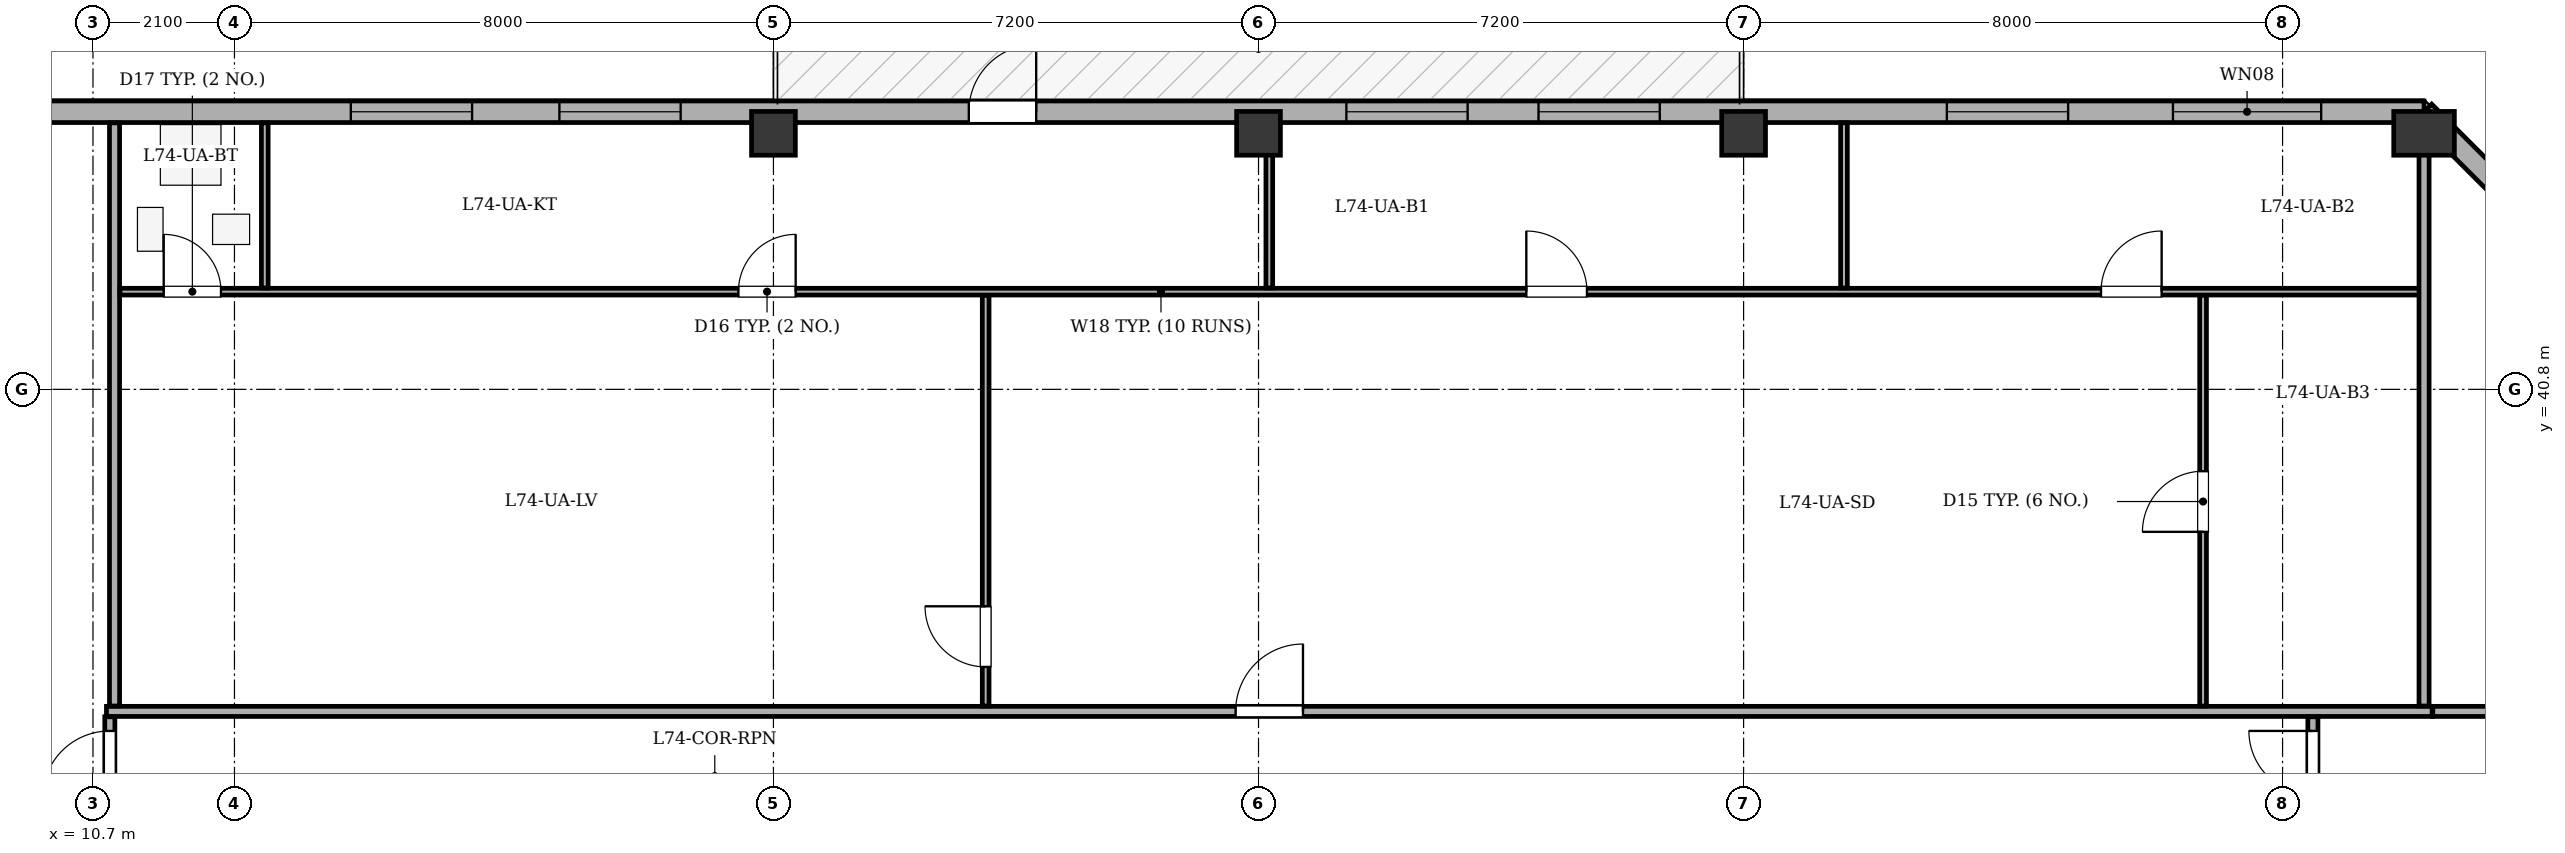
"""IFC4 building model, lengths in metres.
Left out: names, types, materials, properties, quantities, classifications, styles, units other than length and angle.
Written with IfcOpenShell. Run it as: python <this file> out.ifc"""

import sys

from ifc_helpers import new_model, si_unit, direction, frame, frame_2d, origin, origin_2d, place, context, subcontext, project, spatial, rectangle, extrude, element, fill, save


model = new_model("IFC4")
c1 = context("Model", 3, precision=1e-05, world=origin(), true_north=direction((0.0, 1.0)))
c2 = subcontext(c1, "Body", "Model", "MODEL_VIEW")
j1 = project(units=[si_unit("LENGTHUNIT", "METRE"), si_unit("PLANEANGLEUNIT", "RADIAN")], contexts=[c1])
p1 = place(None, origin())
s1 = spatial("IfcSite", under=j1, at=p1, CompositionType="ELEMENT")
p2 = place(p1, origin())
s2 = spatial("IfcBuilding", under=s1, at=p2, CompositionType="ELEMENT")
p3 = place(p2, frame((0.0, 0.0, 278.9)))
s3 = spatial("IfcBuildingStorey", under=s2, at=p3, CompositionType="ELEMENT", Elevation=278.9)
for number, where, z_axis, x_axis in (
    (1, (20.8, 44.6, 0.0), (0.0, 0.0, 1.0), (1.0, 0.0, 0.0)),
    (2, (28.0, 44.6, 0.0), (0.0, 0.0, 1.0), (1.0, 0.0, 0.0)),
    (3, (35.2, 44.6, 0.0), (0.0, 0.0, 1.0), (1.0, 0.0, 0.0)),
):
    element("IfcColumn", number, at=place(p3, frame(where, z_axis=z_axis, x_axis=x_axis)), inside=s3, PredefinedType="COLUMN", context=c2, shape_type="SweptSolid", body=[
        extrude(rectangle(XDim=0.65, YDim=0.65, at=origin_2d()), origin(), (0.0, 0.0, 1.0), 3.4),
    ])
p4 = place(p3, frame((45.3, 44.6, 0.0), z_axis=(0.0, 0.0, 1.0), x_axis=(1.0, 0.0, 0.0)))
e4 = element("IfcColumn", 4, at=p4, inside=s3, PredefinedType="COLUMN", context=c2, shape_type="SweptSolid", body=[
    extrude(rectangle(XDim=0.65, YDim=0.9, at=origin_2d()), origin(), (0.0, 0.0, 1.0), 3.4),
])
p5 = place(p3, frame((8.3, 44.92, 0.0), z_axis=(0.0, 0.0, 1.0), x_axis=(1.0, 0.0, 0.0)))
e5 = element("IfcWall", 5, at=p5, inside=s3, PredefinedType="STANDARD", context=c2, shape_type="SweptSolid", body=[
    extrude(rectangle(XDim=37.0, YDim=0.32, at=frame_2d((18.5, 0.0))), origin(), (0.0, 0.0, 1.0), 2.575),
])
p6 = place(p5, frame((15.4, 0.0, 0.0)))
e6 = element("IfcOpeningElement", 6, at=p6, cuts=e5, PredefinedType="OPENING", context=c2, shape_type="SweptSolid", body=[
    extrude(rectangle(XDim=1.0, YDim=2.02, at=frame_2d((0.5, 1.01))), frame((0.0, 0.17, 0.0), z_axis=(0.0, -1.0, 0.0), x_axis=(1.0, 0.0, 0.0)), (0.0, 0.0, 1.0), 0.34),
])
p7 = place(p5, frame((6.227, 0.0, 0.75)))
e7 = element("IfcOpeningElement", 7, at=p7, cuts=e5, PredefinedType="OPENING", context=c2, shape_type="SweptSolid", body=[
    extrude(rectangle(XDim=1.8, YDim=1.7, at=frame_2d((0.9, 0.85))), frame((0.0, 0.17, 0.0), z_axis=(0.0, -1.0, 0.0), x_axis=(1.0, 0.0, 0.0)), (0.0, 0.0, 1.0), 0.34),
])
p8 = place(p5, frame((9.323, 0.0, 0.75)))
e8 = element("IfcOpeningElement", 8, at=p8, cuts=e5, PredefinedType="OPENING", context=c2, shape_type="SweptSolid", body=[
    extrude(rectangle(XDim=1.8, YDim=1.7, at=frame_2d((0.9, 0.85))), frame((0.0, 0.17, 0.0), z_axis=(0.0, -1.0, 0.0), x_axis=(1.0, 0.0, 0.0)), (0.0, 0.0, 1.0), 0.34),
])
p9 = place(p5, frame((21.004, 0.0, 0.75)))
e9 = element("IfcOpeningElement", 9, at=p9, cuts=e5, PredefinedType="OPENING", context=c2, shape_type="SweptSolid", body=[
    extrude(rectangle(XDim=1.8, YDim=1.7, at=frame_2d((0.9, 0.85))), frame((0.0, 0.17, 0.0), z_axis=(0.0, -1.0, 0.0), x_axis=(1.0, 0.0, 0.0)), (0.0, 0.0, 1.0), 0.34),
])
p10 = place(p5, frame((23.856, 0.0, 0.75)))
e10 = element("IfcOpeningElement", 10, at=p10, cuts=e5, PredefinedType="OPENING", context=c2, shape_type="SweptSolid", body=[
    extrude(rectangle(XDim=1.8, YDim=1.7, at=frame_2d((0.9, 0.85))), frame((0.0, 0.17, 0.0), z_axis=(0.0, -1.0, 0.0), x_axis=(1.0, 0.0, 0.0)), (0.0, 0.0, 1.0), 0.34),
])
p11 = place(p5, frame((29.917, 0.0, 0.75)))
e11 = element("IfcOpeningElement", 11, at=p11, cuts=e5, PredefinedType="OPENING", context=c2, shape_type="SweptSolid", body=[
    extrude(rectangle(XDim=1.8, YDim=1.7, at=frame_2d((0.9, 0.85))), frame((0.0, 0.17, 0.0), z_axis=(0.0, -1.0, 0.0), x_axis=(1.0, 0.0, 0.0)), (0.0, 0.0, 1.0), 0.34),
])
p12 = place(p5, frame((33.273, 0.0, 0.75)))
e12 = element("IfcOpeningElement", 12, at=p12, cuts=e5, PredefinedType="OPENING", context=c2, shape_type="SweptSolid", body=[
    extrude(rectangle(XDim=2.2, YDim=1.7, at=frame_2d((1.1, 0.85))), frame((0.0, 0.17, 0.0), z_axis=(0.0, -1.0, 0.0), x_axis=(1.0, 0.0, 0.0)), (0.0, 0.0, 1.0), 0.34),
])
p13 = place(p3, frame((45.3, 44.92, 0.0), z_axis=(0.0, 0.0, 1.0), x_axis=(0.70712937715, -0.707084184501, 0.0)))
e13 = element("IfcWall", 13, at=p13, inside=s3, PredefinedType="STANDARD", context=c2, shape_type="SweptSolid", body=[
    extrude(rectangle(XDim=5.402, YDim=0.32, at=frame_2d((2.701, 0.0))), origin(), (0.0, 0.0, 1.0), 2.575),
])
p14 = place(p13, frame((2.001, 0.0, 0.75)))
e14 = element("IfcOpeningElement", 14, at=p14, cuts=e13, PredefinedType="OPENING", context=c2, shape_type="SweptSolid", body=[
    extrude(rectangle(XDim=1.4, YDim=1.65, at=frame_2d((0.7, 0.825))), frame((0.0, 0.17, 0.0), z_axis=(0.0, -1.0, 0.0), x_axis=(1.0, 0.0, 0.0)), (0.0, 0.0, 1.0), 0.34),
])
p15 = place(p3, frame((10.9, 36.02, 0.0), z_axis=(0.0, 0.0, 1.0), x_axis=(1.0, 0.0, 0.0)))
e15 = element("IfcWall", 15, at=p15, inside=s3, PredefinedType="PARTITIONING", context=c2, shape_type="SweptSolid", body=[
    extrude(rectangle(XDim=34.52, YDim=0.15, at=frame_2d((17.26, 0.0))), origin(), (0.0, 0.0, 1.0), 2.95),
])
p16 = place(p15, frame((16.76, 0.0, 0.0)))
e16 = element("IfcOpeningElement", 16, at=p16, cuts=e15, PredefinedType="OPENING", context=c2, shape_type="SweptSolid", body=[
    extrude(rectangle(XDim=1.0, YDim=2.1, at=frame_2d((0.5, 1.05))), frame((0.0, 0.085, 0.0), z_axis=(0.0, -1.0, 0.0), x_axis=(1.0, 0.0, 0.0)), (0.0, 0.0, 1.0), 0.17),
])
p17 = place(p3, frame((11.02, 36.1, 0.0), z_axis=(0.0, 0.0, 1.0), x_axis=(0.0, 1.0, 0.0)))
e17 = element("IfcWall", 17, at=p17, inside=s3, PredefinedType="PARTITIONING", context=c2, shape_type="SweptSolid", body=[
    extrude(rectangle(XDim=8.655, YDim=0.15, at=frame_2d((4.327, 0.0))), origin(), (0.0, 0.0, 1.0), 2.95),
])
p18 = place(p3, frame((11.1, 42.25, 0.0), z_axis=(0.0, 0.0, 1.0), x_axis=(1.0, 0.0, 0.0)))
e18 = element("IfcWall", 18, at=p18, inside=s3, PredefinedType="PARTITIONING", context=c2, shape_type="SweptSolid", body=[
    extrude(rectangle(XDim=34.24, YDim=0.1, at=frame_2d((17.12, 0.0))), origin(), (0.0, 0.0, 1.0), 2.95),
])
p19 = place(p18, frame((0.65, 0.0, 0.0)))
e19 = element("IfcOpeningElement", 19, at=p19, cuts=e18, PredefinedType="OPENING", context=c2, shape_type="SweptSolid", body=[
    extrude(rectangle(XDim=0.85, YDim=2.05, at=frame_2d((0.425, 1.025))), frame((0.0, 0.06, 0.0), z_axis=(0.0, -1.0, 0.0), x_axis=(1.0, 0.0, 0.0)), (0.0, 0.0, 1.0), 0.12),
])
p20 = place(p18, frame((9.18, 0.0, 0.0)))
e20 = element("IfcOpeningElement", 20, at=p20, cuts=e18, PredefinedType="OPENING", context=c2, shape_type="SweptSolid", body=[
    extrude(rectangle(XDim=0.85, YDim=2.05, at=frame_2d((0.425, 1.025))), frame((0.0, 0.06, 0.0), z_axis=(0.0, -1.0, 0.0), x_axis=(1.0, 0.0, 0.0)), (0.0, 0.0, 1.0), 0.12),
])
p21 = place(p18, frame((20.875, 0.0, 0.0)))
e21 = element("IfcOpeningElement", 21, at=p21, cuts=e18, PredefinedType="OPENING", context=c2, shape_type="SweptSolid", body=[
    extrude(rectangle(XDim=0.9, YDim=2.05, at=frame_2d((0.45, 1.025))), frame((0.0, 0.06, 0.0), z_axis=(0.0, -1.0, 0.0), x_axis=(1.0, 0.0, 0.0)), (0.0, 0.0, 1.0), 0.12),
])
p22 = place(p18, frame((29.405, 0.0, 0.0)))
e22 = element("IfcOpeningElement", 22, at=p22, cuts=e18, PredefinedType="OPENING", context=c2, shape_type="SweptSolid", body=[
    extrude(rectangle(XDim=0.9, YDim=2.05, at=frame_2d((0.45, 1.025))), frame((0.0, 0.06, 0.0), z_axis=(0.0, -1.0, 0.0), x_axis=(1.0, 0.0, 0.0)), (0.0, 0.0, 1.0), 0.12),
])
p23 = place(p3, frame((42.02, 36.1, 0.0), z_axis=(0.0, 0.0, 1.0), x_axis=(0.0, 1.0, 0.0)))
e23 = element("IfcWall", 23, at=p23, inside=s3, PredefinedType="PARTITIONING", context=c2, shape_type="SweptSolid", body=[
    extrude(rectangle(XDim=6.095, YDim=0.1, at=frame_2d((3.047, 0.0))), origin(), (0.0, 0.0, 1.0), 2.575),
])
p24 = place(p23, frame((2.585, 0.0, 0.0)))
e24 = element("IfcOpeningElement", 24, at=p24, cuts=e23, PredefinedType="OPENING", context=c2, shape_type="SweptSolid", body=[
    extrude(rectangle(XDim=0.9, YDim=2.05, at=frame_2d((0.45, 1.025))), frame((0.0, 0.06, 0.0), z_axis=(0.0, -1.0, 0.0), x_axis=(1.0, 0.0, 0.0)), (0.0, 0.0, 1.0), 0.12),
])
p25 = place(p3, frame((23.95, 36.1, 0.0), z_axis=(0.0, 0.0, 1.0), x_axis=(0.0, 1.0, 0.0)))
e25 = element("IfcWall", 25, at=p25, inside=s3, PredefinedType="PARTITIONING", context=c2, shape_type="SweptSolid", body=[
    extrude(rectangle(XDim=6.095, YDim=0.1, at=frame_2d((3.047, 0.0))), origin(), (0.0, 0.0, 1.0), 2.95),
])
p26 = place(p25, frame((0.58, 0.0, 0.0)))
e26 = element("IfcOpeningElement", 26, at=p26, cuts=e25, PredefinedType="OPENING", context=c2, shape_type="SweptSolid", body=[
    extrude(rectangle(XDim=0.9, YDim=2.05, at=frame_2d((0.45, 1.025))), frame((0.0, 0.06, 0.0), z_axis=(0.0, -1.0, 0.0), x_axis=(1.0, 0.0, 0.0)), (0.0, 0.0, 1.0), 0.12),
])
p27 = place(p3, frame((13.25, 42.305, 0.0), z_axis=(0.0, 0.0, 1.0), x_axis=(0.0, 1.0, 0.0)))
e27 = element("IfcWall", 27, at=p27, inside=s3, PredefinedType="PARTITIONING", context=c2, shape_type="SweptSolid", body=[
    extrude(rectangle(XDim=2.45, YDim=0.1, at=frame_2d((1.225, 0.0))), origin(), (0.0, 0.0, 1.0), 2.95),
])
p28 = place(p3, frame((28.16, 42.305, 0.0), z_axis=(0.0, 0.0, 1.0), x_axis=(0.0, 1.0, 0.0)))
e28 = element("IfcWall", 28, at=p28, inside=s3, PredefinedType="PARTITIONING", context=c2, shape_type="SweptSolid", body=[
    extrude(rectangle(XDim=2.45, YDim=0.1, at=frame_2d((1.225, 0.0))), origin(), (0.0, 0.0, 1.0), 2.385),
])
p29 = place(p3, frame((36.69, 42.305, 0.0), z_axis=(0.0, 0.0, 1.0), x_axis=(0.0, 1.0, 0.0)))
e29 = element("IfcWall", 29, at=p29, inside=s3, PredefinedType="PARTITIONING", context=c2, shape_type="SweptSolid", body=[
    extrude(rectangle(XDim=2.45, YDim=0.1, at=frame_2d((1.225, 0.0))), origin(), (0.0, 0.0, 1.0), 2.575),
])
p30 = place(p3, frame((45.3, 36.1, 0.0), z_axis=(0.0, 0.0, 1.0), x_axis=(0.0, 1.0, 0.0)))
e30 = element("IfcWall", 30, at=p30, inside=s3, PredefinedType="PARTITIONING", context=c2, shape_type="SweptSolid", body=[
    extrude(rectangle(XDim=8.655, YDim=0.15, at=frame_2d((4.327, 0.0))), origin(), (0.0, 0.0, 1.0), 2.95),
])
p31 = place(p3, frame((10.95, 34.15, 0.0), z_axis=(0.0, 0.0, 1.0), x_axis=(0.0, 1.0, 0.0)))
e31 = element("IfcWall", 31, at=p31, inside=s3, PredefinedType="PARTITIONING", context=c2, shape_type="SweptSolid", body=[
    extrude(rectangle(XDim=1.79, YDim=0.15, at=frame_2d((0.895, 0.0))), origin(), (0.0, 0.0, 1.0), 2.95),
])
p32 = place(p31, frame((0.58, 0.0, 0.0)))
e32 = element("IfcOpeningElement", 32, at=p32, cuts=e31, PredefinedType="OPENING", context=c2, shape_type="SweptSolid", body=[
    extrude(rectangle(XDim=1.0, YDim=2.1, at=frame_2d((0.5, 1.05))), frame((0.0, 0.085, 0.0), z_axis=(0.0, -1.0, 0.0), x_axis=(1.0, 0.0, 0.0)), (0.0, 0.0, 1.0), 0.17),
])
p33 = place(p3, frame((45.43, 36.02, 0.0), z_axis=(0.0, 0.0, 1.0), x_axis=(1.0, 0.0, 0.0)))
e33 = element("IfcWall", 33, at=p33, inside=s3, PredefinedType="PARTITIONING", context=c2, shape_type="SweptSolid", body=[
    extrude(rectangle(XDim=3.525, YDim=0.15, at=frame_2d((1.763, 0.0))), origin(), (0.0, 0.0, 1.0), 2.95),
])
p34 = place(p3, frame((43.65, 34.15, 0.0), z_axis=(0.0, 0.0, 1.0), x_axis=(0.0, 1.0, 0.0)))
e34 = element("IfcWall", 34, at=p34, inside=s3, PredefinedType="PARTITIONING", context=c2, shape_type="SweptSolid", body=[
    extrude(rectangle(XDim=1.79, YDim=0.15, at=frame_2d((0.895, 0.0))), origin(), (0.0, 0.0, 1.0), 2.95),
])
p35 = place(p34, frame((0.63, 0.0, 0.0)))
e35 = element("IfcOpeningElement", 35, at=p35, cuts=e34, PredefinedType="OPENING", context=c2, shape_type="SweptSolid", body=[
    extrude(rectangle(XDim=0.95, YDim=2.1, at=frame_2d((0.475, 1.05))), frame((0.0, 0.085, 0.0), z_axis=(0.0, -1.0, 0.0), x_axis=(1.0, 0.0, 0.0)), (0.0, 0.0, 1.0), 0.17),
])
p36 = place(p6, origin())
e36 = element("IfcDoor", 36, at=p36, inside=s3, OperationType="SINGLE_SWING_RIGHT", PredefinedType="DOOR", context=c2, shape_type="SweptSolid", body=[
    extrude(rectangle(XDim=1.0, YDim=2.02, at=frame_2d((0.5, 1.01))), frame((0.0, 0.025, 0.0), z_axis=(0.0, -1.0, 0.0), x_axis=(1.0, 0.0, 0.0)), (0.0, 0.0, 1.0), 0.05),
])
fill(e6, e36)
p37 = place(p7, origin())
e37 = element("IfcWindow", 37, at=p37, inside=s3, PartitioningType="SINGLE_PANEL", PredefinedType="WINDOW", context=c2, shape_type="SweptSolid", body=[
    extrude(rectangle(XDim=1.8, YDim=1.7, at=frame_2d((0.9, 0.85))), frame((0.0, -0.01, 0.0), z_axis=(0.0, -1.0, 0.0), x_axis=(1.0, 0.0, 0.0)), (0.0, 0.0, 1.0), 0.06),
])
fill(e7, e37)
p38 = place(p8, origin())
e38 = element("IfcWindow", 38, at=p38, inside=s3, PartitioningType="SINGLE_PANEL", PredefinedType="WINDOW", context=c2, shape_type="SweptSolid", body=[
    extrude(rectangle(XDim=1.8, YDim=1.7, at=frame_2d((0.9, 0.85))), frame((0.0, -0.01, 0.0), z_axis=(0.0, -1.0, 0.0), x_axis=(1.0, 0.0, 0.0)), (0.0, 0.0, 1.0), 0.06),
])
fill(e8, e38)
p39 = place(p9, origin())
e39 = element("IfcWindow", 39, at=p39, inside=s3, PartitioningType="SINGLE_PANEL", PredefinedType="WINDOW", context=c2, shape_type="SweptSolid", body=[
    extrude(rectangle(XDim=1.8, YDim=1.7, at=frame_2d((0.9, 0.85))), frame((0.0, -0.01, 0.0), z_axis=(0.0, -1.0, 0.0), x_axis=(1.0, 0.0, 0.0)), (0.0, 0.0, 1.0), 0.06),
])
fill(e9, e39)
p40 = place(p10, origin())
e40 = element("IfcWindow", 40, at=p40, inside=s3, PartitioningType="SINGLE_PANEL", PredefinedType="WINDOW", context=c2, shape_type="SweptSolid", body=[
    extrude(rectangle(XDim=1.8, YDim=1.7, at=frame_2d((0.9, 0.85))), frame((0.0, -0.01, 0.0), z_axis=(0.0, -1.0, 0.0), x_axis=(1.0, 0.0, 0.0)), (0.0, 0.0, 1.0), 0.06),
])
fill(e10, e40)
p41 = place(p11, origin())
e41 = element("IfcWindow", 41, at=p41, inside=s3, PartitioningType="SINGLE_PANEL", PredefinedType="WINDOW", context=c2, shape_type="SweptSolid", body=[
    extrude(rectangle(XDim=1.8, YDim=1.7, at=frame_2d((0.9, 0.85))), frame((0.0, -0.01, 0.0), z_axis=(0.0, -1.0, 0.0), x_axis=(1.0, 0.0, 0.0)), (0.0, 0.0, 1.0), 0.06),
])
fill(e11, e41)
p42 = place(p12, origin())
e42 = element("IfcWindow", 42, at=p42, inside=s3, PartitioningType="SINGLE_PANEL", PredefinedType="WINDOW", context=c2, shape_type="SweptSolid", body=[
    extrude(rectangle(XDim=2.2, YDim=1.7, at=frame_2d((1.1, 0.85))), frame((0.0, -0.01, 0.0), z_axis=(0.0, -1.0, 0.0), x_axis=(1.0, 0.0, 0.0)), (0.0, 0.0, 1.0), 0.06),
])
fill(e12, e42)
p43 = place(p16, origin())
e43 = element("IfcDoor", 43, at=p43, inside=s3, OperationType="SINGLE_SWING_RIGHT", PredefinedType="DOOR", context=c2, shape_type="SweptSolid", body=[
    extrude(rectangle(XDim=1.0, YDim=2.1, at=frame_2d((0.5, 1.05))), frame((0.0, 0.025, 0.0), z_axis=(0.0, -1.0, 0.0), x_axis=(1.0, 0.0, 0.0)), (0.0, 0.0, 1.0), 0.05),
])
fill(e16, e43)
p44 = place(p24, origin())
e44 = element("IfcDoor", 44, at=p44, inside=s3, OperationType="SINGLE_SWING_LEFT", PredefinedType="DOOR", context=c2, shape_type="SweptSolid", body=[
    extrude(rectangle(XDim=0.9, YDim=2.05, at=frame_2d((0.45, 1.025))), frame((0.0, 0.025, 0.0), z_axis=(0.0, -1.0, 0.0), x_axis=(1.0, 0.0, 0.0)), (0.0, 0.0, 1.0), 0.05),
])
fill(e24, e44)
p45 = place(p26, origin())
e45 = element("IfcDoor", 45, at=p45, inside=s3, OperationType="SINGLE_SWING_RIGHT", PredefinedType="DOOR", context=c2, shape_type="SweptSolid", body=[
    extrude(rectangle(XDim=0.9, YDim=2.05, at=frame_2d((0.45, 1.025))), frame((0.0, 0.025, 0.0), z_axis=(0.0, -1.0, 0.0), x_axis=(1.0, 0.0, 0.0)), (0.0, 0.0, 1.0), 0.05),
])
fill(e26, e45)
p46 = place(p19, origin())
e46 = element("IfcDoor", 46, at=p46, inside=s3, OperationType="SINGLE_SWING_LEFT", PredefinedType="DOOR", context=c2, shape_type="SweptSolid", body=[
    extrude(rectangle(XDim=0.85, YDim=2.05, at=frame_2d((0.425, 1.025))), frame((0.0, 0.025, 0.0), z_axis=(0.0, -1.0, 0.0), x_axis=(1.0, 0.0, 0.0)), (0.0, 0.0, 1.0), 0.05),
])
fill(e19, e46)
p47 = place(p20, origin())
e47 = element("IfcDoor", 47, at=p47, inside=s3, OperationType="SINGLE_SWING_RIGHT", PredefinedType="DOOR", context=c2, shape_type="SweptSolid", body=[
    extrude(rectangle(XDim=0.85, YDim=2.05, at=frame_2d((0.425, 1.025))), frame((0.0, 0.025, 0.0), z_axis=(0.0, -1.0, 0.0), x_axis=(1.0, 0.0, 0.0)), (0.0, 0.0, 1.0), 0.05),
])
fill(e20, e47)
p48 = place(p21, origin())
e48 = element("IfcDoor", 48, at=p48, inside=s3, OperationType="SINGLE_SWING_LEFT", PredefinedType="DOOR", context=c2, shape_type="SweptSolid", body=[
    extrude(rectangle(XDim=0.9, YDim=2.05, at=frame_2d((0.45, 1.025))), frame((0.0, 0.025, 0.0), z_axis=(0.0, -1.0, 0.0), x_axis=(1.0, 0.0, 0.0)), (0.0, 0.0, 1.0), 0.05),
])
fill(e21, e48)
p49 = place(p22, origin())
e49 = element("IfcDoor", 49, at=p49, inside=s3, OperationType="SINGLE_SWING_RIGHT", PredefinedType="DOOR", context=c2, shape_type="SweptSolid", body=[
    extrude(rectangle(XDim=0.9, YDim=2.05, at=frame_2d((0.45, 1.025))), frame((0.0, 0.025, 0.0), z_axis=(0.0, -1.0, 0.0), x_axis=(1.0, 0.0, 0.0)), (0.0, 0.0, 1.0), 0.05),
])
fill(e22, e49)
p50 = place(p32, origin())
e50 = element("IfcDoor", 50, at=p50, inside=s3, OperationType="SINGLE_SWING_LEFT", PredefinedType="DOOR", context=c2, shape_type="SweptSolid", body=[
    extrude(rectangle(XDim=1.0, YDim=2.1, at=frame_2d((0.5, 1.05))), frame((0.0, 0.025, 0.0), z_axis=(0.0, -1.0, 0.0), x_axis=(1.0, 0.0, 0.0)), (0.0, 0.0, 1.0), 0.05),
])
fill(e32, e50)
p51 = place(p35, origin())
e51 = element("IfcDoor", 51, at=p51, inside=s3, OperationType="SINGLE_SWING_RIGHT", PredefinedType="DOOR", context=c2, shape_type="SweptSolid", body=[
    extrude(rectangle(XDim=0.95, YDim=2.1, at=frame_2d((0.475, 1.05))), frame((0.0, 0.025, 0.0), z_axis=(0.0, -1.0, 0.0), x_axis=(1.0, 0.0, 0.0)), (0.0, 0.0, 1.0), 0.05),
])
fill(e35, e51)
save(model, sys.argv[1])
